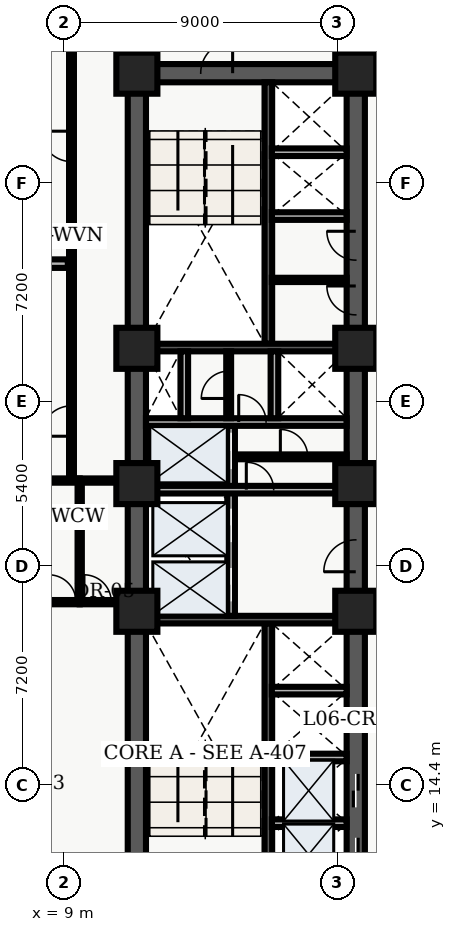
"""IFC4 building model, lengths in metres.
Left out: names, types, materials, properties, quantities, classifications, styles, units other than length and angle.
Written with IfcOpenShell. Run it as: python <this file> out.ifc"""

import sys

from ifc_helpers import new_model, entity, si_unit, converted_unit, direction, frame, origin_with_axes, origin_2d_with_axis, place, context, subcontext, project, spatial, polyline, rectangle, outline, extrude, element, fill, save


model = new_model("IFC4")
c1 = context("Model", 3, precision=1e-05, world=origin_with_axes(), true_north=direction((0.0, 1.0)))
c2 = subcontext(c1, "Body", "Model", "MODEL_VIEW")
j1 = project(units=[si_unit("LENGTHUNIT", "METRE"), converted_unit("PLANEANGLEUNIT", "DEGREE", entity("IfcPlaneAngleMeasure", 0.017), si_unit("PLANEANGLEUNIT", "RADIAN"), dimensions=[0, 0, 0, 0, 0, 0, 0])], contexts=[c1])
p1 = place(None, origin_with_axes())
s1 = spatial("IfcSite", under=j1, at=p1, CompositionType="ELEMENT")
p2 = place(p1, origin_with_axes())
s2 = spatial("IfcBuilding", under=s1, at=p2, CompositionType="ELEMENT")
p3 = place(p2, frame((0.0, 0.0, 28.8), z_axis=(0.0, 0.0, 1.0), x_axis=(1.0, 0.0, 0.0)))
s3 = spatial("IfcBuildingStorey", under=s2, at=p3, CompositionType="ELEMENT", Elevation=28.8)
p4 = place(p3, frame((11.4, 10.8, 0.0), z_axis=(0.0, 0.0, 1.0), x_axis=(0.0, 1.0, 0.0)))
e1 = element("IfcWall", 1, at=p4, inside=s3, PredefinedType="SHEAR", context=c2, shape_type="SweptSolid", body=[
    extrude(outline(polyline([(0.0, -0.3), (27.0, -0.3), (27.0, 0.3), (0.0, 0.3), (0.0, -0.3)])), origin_with_axes(), (0.0, 0.0, 1.0), 3.66),
])
p5 = place(p3, frame((11.4, 37.8, 0.0), z_axis=(0.0, 0.0, 1.0), x_axis=(1.0, 0.0, 0.0)))
e2 = element("IfcWall", 2, at=p5, inside=s3, PredefinedType="SHEAR", context=c2, shape_type="SweptSolid", body=[
    extrude(outline(polyline([(0.0, -0.3), (7.2, -0.3), (7.2, 0.3), (0.0, 0.3), (0.0, -0.3)])), origin_with_axes(), (0.0, 0.0, 1.0), 3.66),
])
p6 = place(p5, frame((2.625, 0.0, 0.0), z_axis=(0.0, 0.0, 1.0), x_axis=(1.0, 0.0, 0.0)))
e3 = element("IfcOpeningElement", 3, at=p6, cuts=e2, PredefinedType="OPENING", context=c2, shape_type="SweptSolid", body=[
    extrude(rectangle(XDim=1.05, YDim=0.62, at=origin_2d_with_axis()), origin_with_axes(), (0.0, 0.0, 1.0), 2.15),
])
p7 = place(p3, frame((18.6, 10.8, 0.0), z_axis=(0.0, 0.0, 1.0), x_axis=(0.0, 1.0, 0.0)))
e4 = element("IfcWall", 4, at=p7, inside=s3, PredefinedType="SHEAR", context=c2, shape_type="SweptSolid", body=[
    extrude(outline(polyline([(0.0, -0.3), (13.5, -0.3), (13.5, 0.3), (0.0, 0.3), (0.0, -0.3)])), origin_with_axes(), (0.0, 0.0, 1.0), 3.66),
])
p8 = place(p7, frame((1.3, 0.0, 0.0), z_axis=(0.0, 0.0, 1.0), x_axis=(1.0, 0.0, 0.0)))
e5 = element("IfcOpeningElement", 5, at=p8, cuts=e4, PredefinedType="OPENING", context=c2, shape_type="SweptSolid", body=[
    extrude(rectangle(XDim=1.1, YDim=0.62, at=origin_2d_with_axis()), origin_with_axes(), (0.0, 0.0, 1.0), 2.15),
])
p9 = place(p7, frame((3.4, 0.0, 0.0), z_axis=(0.0, 0.0, 1.0), x_axis=(1.0, 0.0, 0.0)))
e6 = element("IfcOpeningElement", 6, at=p9, cuts=e4, PredefinedType="OPENING", context=c2, shape_type="SweptSolid", body=[
    extrude(rectangle(XDim=1.1, YDim=0.62, at=origin_2d_with_axis()), origin_with_axes(), (0.0, 0.0, 1.0), 2.15),
])
p10 = place(p7, frame((11.125, 0.0, 0.0), z_axis=(0.0, 0.0, 1.0), x_axis=(1.0, 0.0, 0.0)))
e7 = element("IfcOpeningElement", 7, at=p10, cuts=e4, PredefinedType="OPENING", context=c2, shape_type="SweptSolid", body=[
    extrude(rectangle(XDim=1.05, YDim=0.62, at=origin_2d_with_axis()), origin_with_axes(), (0.0, 0.0, 1.0), 2.15),
])
p11 = place(p3, frame((18.6, 24.3, 0.0), z_axis=(0.0, 0.0, 1.0), x_axis=(0.0, 1.0, 0.0)))
e8 = element("IfcWall", 8, at=p11, inside=s3, PredefinedType="SHEAR", context=c2, shape_type="SweptSolid", body=[
    extrude(outline(polyline([(0.0, -0.3), (13.5, -0.3), (13.5, 0.3), (0.0, 0.3), (0.0, -0.3)])), origin_with_axes(), (0.0, 0.0, 1.0), 3.66),
])
p12 = place(p11, frame((6.025, 0.0, 0.0), z_axis=(0.0, 0.0, 1.0), x_axis=(1.0, 0.0, 0.0)))
e9 = element("IfcOpeningElement", 9, at=p12, cuts=e8, PredefinedType="OPENING", context=c2, shape_type="SweptSolid", body=[
    extrude(rectangle(XDim=0.95, YDim=0.62, at=origin_2d_with_axis()), origin_with_axes(), (0.0, 0.0, 1.0), 2.15),
])
p13 = place(p11, frame((7.825, 0.0, 0.0), z_axis=(0.0, 0.0, 1.0), x_axis=(1.0, 0.0, 0.0)))
e10 = element("IfcOpeningElement", 10, at=p13, cuts=e8, PredefinedType="OPENING", context=c2, shape_type="SweptSolid", body=[
    extrude(rectangle(XDim=0.95, YDim=0.62, at=origin_2d_with_axis()), origin_with_axes(), (0.0, 0.0, 1.0), 2.15),
])
p14 = place(p3, frame((15.725, 11.1, 0.0), z_axis=(0.0, 0.0, 1.0), x_axis=(0.0, 1.0, 0.0)))
e11 = element("IfcWall", 11, at=p14, inside=s3, PredefinedType="SHEAR", context=c2, shape_type="SweptSolid", body=[
    extrude(outline(polyline([(0.0, -0.125), (8.6, -0.125), (8.6, 0.125), (0.0, 0.125), (0.0, -0.125)])), origin_with_axes(), (0.0, 0.0, 1.0), 3.66),
])
p15 = place(p3, frame((11.7, 19.825, 0.0), z_axis=(0.0, 0.0, 1.0), x_axis=(1.0, 0.0, 0.0)))
e12 = element("IfcWall", 12, at=p15, inside=s3, PredefinedType="SHEAR", context=c2, shape_type="SweptSolid", body=[
    extrude(outline(polyline([(0.0, -0.125), (6.6, -0.125), (6.6, 0.125), (0.0, 0.125), (0.0, -0.125)])), origin_with_axes(), (0.0, 0.0, 1.0), 3.66),
])
p16 = place(p3, frame((15.725, 28.9, 0.0), z_axis=(0.0, 0.0, 1.0), x_axis=(0.0, 1.0, 0.0)))
e13 = element("IfcWall", 13, at=p16, inside=s3, PredefinedType="SHEAR", context=c2, shape_type="SweptSolid", body=[
    extrude(outline(polyline([(0.0, -0.125), (8.6, -0.125), (8.6, 0.125), (0.0, 0.125), (0.0, -0.125)])), origin_with_axes(), (0.0, 0.0, 1.0), 3.66),
])
p17 = place(p3, frame((11.7, 28.775, 0.0), z_axis=(0.0, 0.0, 1.0), x_axis=(1.0, 0.0, 0.0)))
e14 = element("IfcWall", 14, at=p17, inside=s3, PredefinedType="SHEAR", context=c2, shape_type="SweptSolid", body=[
    extrude(outline(polyline([(0.0, -0.125), (6.6, -0.125), (6.6, 0.125), (0.0, 0.125), (0.0, -0.125)])), origin_with_axes(), (0.0, 0.0, 1.0), 3.66),
])
p18 = place(p3, frame((14.5, 19.95, 0.0), z_axis=(0.0, 0.0, 1.0), x_axis=(0.0, 1.0, 0.0)))
e15 = element("IfcWall", 15, at=p18, inside=s3, PredefinedType="SOLIDWALL", context=c2, shape_type="SweptSolid", body=[
    extrude(outline(polyline([(0.0, -0.125), (6.25, -0.125), (6.25, 0.125), (0.0, 0.125), (0.0, -0.125)])), origin_with_axes(), (0.0, 0.0, 1.0), 2.7),
])
p19 = place(p18, frame((1.025, 0.0, 0.0), z_axis=(0.0, 0.0, 1.0), x_axis=(1.0, 0.0, 0.0)))
e16 = element("IfcOpeningElement", 16, at=p19, cuts=e15, PredefinedType="OPENING", context=c2, shape_type="SweptSolid", body=[
    extrude(rectangle(XDim=1.1, YDim=0.27, at=origin_2d_with_axis()), origin_with_axes(), (0.0, 0.0, 1.0), 2.15),
])
p20 = place(p18, frame((2.975, 0.0, 0.0), z_axis=(0.0, 0.0, 1.0), x_axis=(1.0, 0.0, 0.0)))
e17 = element("IfcOpeningElement", 17, at=p20, cuts=e15, PredefinedType="OPENING", context=c2, shape_type="SweptSolid", body=[
    extrude(rectangle(XDim=1.1, YDim=0.27, at=origin_2d_with_axis()), origin_with_axes(), (0.0, 0.0, 1.0), 2.15),
])
p21 = place(p18, frame((5.425, 0.0, 0.0), z_axis=(0.0, 0.0, 1.0), x_axis=(1.0, 0.0, 0.0)))
e18 = element("IfcOpeningElement", 18, at=p21, cuts=e15, PredefinedType="OPENING", context=c2, shape_type="SweptSolid", body=[
    extrude(rectangle(XDim=1.2, YDim=0.27, at=origin_2d_with_axis()), origin_with_axes(), (0.0, 0.0, 1.0), 2.15),
])
p22 = place(p3, frame((11.7, 24.1, 0.0), z_axis=(0.0, 0.0, 1.0), x_axis=(1.0, 0.0, 0.0)))
e19 = element("IfcWall", 19, at=p22, inside=s3, PredefinedType="SOLIDWALL", context=c2, shape_type="SweptSolid", body=[
    extrude(outline(polyline([(0.0, -0.125), (6.6, -0.125), (6.6, 0.125), (0.0, 0.125), (0.0, -0.125)])), origin_with_axes(), (0.0, 0.0, 1.0), 2.7),
])
p23 = place(p22, frame((3.75, 0.0, 0.0), z_axis=(0.0, 0.0, 1.0), x_axis=(1.0, 0.0, 0.0)))
e20 = element("IfcOpeningElement", 20, at=p23, cuts=e19, PredefinedType="OPENING", context=c2, shape_type="SweptSolid", body=[
    extrude(rectangle(XDim=0.9, YDim=0.27, at=origin_2d_with_axis()), origin_with_axes(), (0.0, 0.0, 1.0), 2.15),
])
p24 = place(p3, frame((11.7, 26.325, 0.0), z_axis=(0.0, 0.0, 1.0), x_axis=(1.0, 0.0, 0.0)))
e21 = element("IfcWall", 21, at=p24, inside=s3, PredefinedType="SOLIDWALL", context=c2, shape_type="SweptSolid", body=[
    extrude(outline(polyline([(0.0, -0.125), (6.6, -0.125), (6.6, 0.125), (0.0, 0.125), (0.0, -0.125)])), origin_with_axes(), (0.0, 0.0, 1.0), 2.7),
])
p25 = place(p24, frame((3.5, 0.0, 0.0), z_axis=(0.0, 0.0, 1.0), x_axis=(1.0, 0.0, 0.0)))
e22 = element("IfcOpeningElement", 22, at=p25, cuts=e21, PredefinedType="OPENING", context=c2, shape_type="SweptSolid", body=[
    extrude(rectangle(XDim=0.9, YDim=0.27, at=origin_2d_with_axis()), origin_with_axes(), (0.0, 0.0, 1.0), 2.15),
])
for number, where, z_axis, x_axis in (
    (23, (12.96, 26.45, 0.0), (0.0, 0.0, 1.0), (0.0, 1.0, 0.0)),
    (24, (15.925, 26.45, 0.0), (0.0, 0.0, 1.0), (0.0, 1.0, 0.0)),
):
    element("IfcWall", number, at=place(p3, frame(where, z_axis=z_axis, x_axis=x_axis)), inside=s3, PredefinedType="SOLIDWALL", context=c2, shape_type="SweptSolid", body=[
        extrude(outline(polyline([(0.0, -0.125), (2.2, -0.125), (2.2, 0.125), (0.0, 0.125), (0.0, -0.125)])), origin_with_axes(), (0.0, 0.0, 1.0), 2.7),
    ])
for number, where, z_axis, x_axis in (
    (25, (11.4, 20.1, 0.0), (0.0, 0.0, 1.0), (1.0, 0.0, 0.0)),
    (26, (11.4, 24.3, 0.0), (0.0, 0.0, 1.0), (1.0, 0.0, 0.0)),
    (27, (11.4, 28.75, 0.0), (0.0, 0.0, 1.0), (1.0, 0.0, 0.0)),
    (28, (11.4, 37.8, 0.0), (0.0, 0.0, 1.0), (1.0, 0.0, 0.0)),
    (29, (18.6, 20.1, 0.0), (0.0, 0.0, 1.0), (1.0, 0.0, 0.0)),
    (30, (18.6, 24.3, 0.0), (0.0, 0.0, 1.0), (1.0, 0.0, 0.0)),
    (31, (18.6, 28.75, 0.0), (0.0, 0.0, 1.0), (1.0, 0.0, 0.0)),
    (32, (18.6, 37.8, 0.0), (0.0, 0.0, 1.0), (1.0, 0.0, 0.0)),
):
    element("IfcColumn", number, at=place(p3, frame(where, z_axis=z_axis, x_axis=x_axis)), inside=s3, PredefinedType="COLUMN", context=c2, shape_type="SweptSolid", body=[
        extrude(rectangle(XDim=1.35, YDim=1.35, at=origin_2d_with_axis()), origin_with_axes(), (0.0, 0.0, 1.0), 3.9),
    ])
p26 = place(p3, frame((14.62, 25.18, 0.0), z_axis=(0.0, 0.0, 1.0), x_axis=(1.0, 0.0, 0.0)))
e33 = element("IfcWall", 33, at=p26, inside=s3, PredefinedType="PARTITIONING", context=c2, shape_type="SweptSolid", body=[
    extrude(outline(polyline([(0.0, -0.08), (3.68, -0.08), (3.68, 0.08), (0.0, 0.08), (0.0, -0.08)])), origin_with_axes(), (0.0, 0.0, 1.0), 2.7),
])
p27 = place(p26, frame((1.95, 0.0, 0.0), z_axis=(0.0, 0.0, 1.0), x_axis=(1.0, 0.0, 0.0)))
e34 = element("IfcOpeningElement", 34, at=p27, cuts=e33, PredefinedType="OPENING", context=c2, shape_type="SweptSolid", body=[
    extrude(rectangle(XDim=0.9, YDim=0.18, at=origin_2d_with_axis()), origin_with_axes(), (0.0, 0.0, 1.0), 2.15),
])
p28 = place(p3, frame((14.42, 26.45, 0.0), z_axis=(0.0, 0.0, 1.0), x_axis=(0.0, 1.0, 0.0)))
e35 = element("IfcWall", 35, at=p28, inside=s3, PredefinedType="PARTITIONING", context=c2, shape_type="SweptSolid", body=[
    extrude(outline(polyline([(0.0, -0.08), (2.2, -0.08), (2.2, 0.08), (0.0, 0.08), (0.0, -0.08)])), origin_with_axes(), (0.0, 0.0, 1.0), 2.7),
])
p29 = place(p28, frame((1.1, 0.0, 0.0), z_axis=(0.0, 0.0, 1.0), x_axis=(1.0, 0.0, 0.0)))
e36 = element("IfcOpeningElement", 36, at=p29, cuts=e35, PredefinedType="OPENING", context=c2, shape_type="SweptSolid", body=[
    extrude(rectangle(XDim=0.9, YDim=0.18, at=origin_2d_with_axis()), origin_with_axes(), (0.0, 0.0, 1.0), 2.15),
])
for number, where, z_axis, x_axis in (
    (37, (15.84, 13.13, 0.0), (0.0, 0.0, 1.0), (1.0, 0.0, 0.0)),
    (38, (15.84, 15.29, 0.0), (0.0, 0.0, 1.0), (1.0, 0.0, 0.0)),
    (39, (15.84, 17.49, 0.0), (0.0, 0.0, 1.0), (1.0, 0.0, 0.0)),
    (40, (15.84, 33.1, 0.0), (0.0, 0.0, 1.0), (1.0, 0.0, 0.0)),
    (41, (15.84, 35.2, 0.0), (0.0, 0.0, 1.0), (1.0, 0.0, 0.0)),
):
    element("IfcWall", number, at=place(p3, frame(where, z_axis=z_axis, x_axis=x_axis)), inside=s3, PredefinedType="SOLIDWALL", context=c2, shape_type="SweptSolid", body=[
        extrude(outline(polyline([(0.0, -0.125), (2.46, -0.125), (2.46, 0.125), (0.0, 0.125), (0.0, -0.125)])), origin_with_axes(), (0.0, 0.0, 1.0), 2.7),
    ])
p30 = place(p3, frame((15.84, 31.0, 0.0), z_axis=(0.0, 0.0, 1.0), x_axis=(1.0, 0.0, 0.0)))
e42 = element("IfcWall", 42, at=p30, inside=s3, PredefinedType="PARTITIONING", context=c2, shape_type="SweptSolid", body=[
    extrude(outline(polyline([(0.0, -0.07), (2.46, -0.07), (2.46, 0.07), (0.0, 0.07), (0.0, -0.07)])), origin_with_axes(), (0.0, 0.0, 1.0), 2.7),
])
p31 = place(p3, frame((9.52, 20.4, 0.0), z_axis=(0.0, 0.0, 1.0), x_axis=(0.0, 1.0, 0.0)))
e43 = element("IfcWall", 43, at=p31, inside=s3, PredefinedType="PARTITIONING", context=c2, shape_type="SweptSolid", body=[
    extrude(outline(polyline([(0.0, -0.07), (4.0, -0.07), (4.0, 0.07), (0.0, 0.07), (0.0, -0.07)])), origin_with_axes(), (0.0, 0.0, 1.0), 2.7),
])
p32 = place(p3, frame((9.52, 20.4, 0.0), z_axis=(0.0, 0.0, 1.0), x_axis=(1.0, 0.0, 0.0)))
e44 = element("IfcWall", 44, at=p32, inside=s3, PredefinedType="PARTITIONING", context=c2, shape_type="SweptSolid", body=[
    extrude(outline(polyline([(0.0, -0.07), (1.58, -0.07), (1.58, 0.07), (0.0, 0.07), (0.0, -0.07)])), origin_with_axes(), (0.0, 0.0, 1.0), 2.7),
])
p33 = place(p32, frame((0.59, 0.0, 0.0), z_axis=(0.0, 0.0, 1.0), x_axis=(1.0, 0.0, 0.0)))
e45 = element("IfcOpeningElement", 45, at=p33, cuts=e44, PredefinedType="OPENING", context=c2, shape_type="SweptSolid", body=[
    extrude(rectangle(XDim=0.9, YDim=0.16, at=origin_2d_with_axis()), origin_with_axes(), (0.0, 0.0, 1.0), 2.15),
])
p34 = place(p3, frame((9.52, 24.4, 0.0), z_axis=(0.0, 0.0, 1.0), x_axis=(1.0, 0.0, 0.0)))
e46 = element("IfcWall", 46, at=p34, inside=s3, PredefinedType="PARTITIONING", context=c2, shape_type="SweptSolid", body=[
    extrude(outline(polyline([(0.0, -0.07), (1.58, -0.07), (1.58, 0.07), (0.0, 0.07), (0.0, -0.07)])), origin_with_axes(), (0.0, 0.0, 1.0), 2.7),
])
p35 = place(p3, frame((9.25, 24.4, 0.0), z_axis=(0.0, 0.0, 1.0), x_axis=(0.0, 1.0, 0.0)))
e47 = element("IfcWall", 47, at=p35, inside=s3, PredefinedType="PARTITIONING", context=c2, shape_type="SweptSolid", body=[
    extrude(outline(polyline([(0.0, -0.08), (16.1, -0.08), (16.1, 0.08), (0.0, 0.08), (0.0, -0.08)])), origin_with_axes(), (0.0, 0.0, 1.0), 2.7),
])
p36 = place(p35, frame((1.958, 0.0, 0.0), z_axis=(0.0, 0.0, 1.0), x_axis=(1.0, 0.0, 0.0)))
e48 = element("IfcOpeningElement", 48, at=p36, cuts=e47, PredefinedType="OPENING", context=c2, shape_type="SweptSolid", body=[
    extrude(rectangle(XDim=1.0, YDim=0.18, at=origin_2d_with_axis()), origin_with_axes(), (0.0, 0.0, 1.0), 2.15),
])
p37 = place(p35, frame((10.992, 0.0, 0.0), z_axis=(0.0, 0.0, 1.0), x_axis=(1.0, 0.0, 0.0)))
e49 = element("IfcOpeningElement", 49, at=p37, cuts=e47, PredefinedType="OPENING", context=c2, shape_type="SweptSolid", body=[
    extrude(rectangle(XDim=1.0, YDim=0.18, at=origin_2d_with_axis()), origin_with_axes(), (0.0, 0.0, 1.0), 2.15),
])
p38 = place(p3, frame((0.36, 20.4, 0.0), z_axis=(0.0, 0.0, 1.0), x_axis=(1.0, 0.0, 0.0)))
e50 = element("IfcWall", 50, at=p38, inside=s3, PredefinedType="PARTITIONING", context=c2, shape_type="SweptSolid", body=[
    extrude(outline(polyline([(0.0, -0.07), (9.16, -0.07), (9.16, 0.07), (0.0, 0.07), (0.0, -0.07)])), origin_with_axes(), (0.0, 0.0, 1.0), 2.7),
])
p39 = place(p38, frame((8.59, 0.0, 0.0), z_axis=(0.0, 0.0, 1.0), x_axis=(1.0, 0.0, 0.0)))
e51 = element("IfcOpeningElement", 51, at=p39, cuts=e50, PredefinedType="OPENING", context=c2, shape_type="SweptSolid", body=[
    extrude(rectangle(XDim=0.9, YDim=0.16, at=origin_2d_with_axis()), origin_with_axes(), (0.0, 0.0, 1.0), 2.15),
])
p40 = place(p3, frame((0.36, 24.4, 0.0), z_axis=(0.0, 0.0, 1.0), x_axis=(1.0, 0.0, 0.0)))
e52 = element("IfcWall", 52, at=p40, inside=s3, PredefinedType="PARTITIONING", context=c2, shape_type="SweptSolid", body=[
    extrude(outline(polyline([(0.0, -0.07), (9.16, -0.07), (9.16, 0.07), (0.0, 0.07), (0.0, -0.07)])), origin_with_axes(), (0.0, 0.0, 1.0), 2.7),
])
p41 = place(p3, frame((0.375, 31.535, 0.0), z_axis=(0.0, 0.0, 1.0), x_axis=(1.0, 0.0, 0.0)))
e53 = element("IfcWall", 53, at=p41, inside=s3, PredefinedType="PARTITIONING", context=c2, shape_type="SweptSolid", body=[
    extrude(outline(polyline([(0.0, -0.14), (8.755, -0.14), (8.755, 0.14), (0.0, 0.14), (0.0, -0.14)])), origin_with_axes(), (0.0, 0.0, 1.0), 2.7),
])
p42 = place(p7, frame((1.3, 0.0, 0.0), z_axis=(0.0, 0.0, 1.0), x_axis=(1.0, 0.0, 0.0)))
e54 = element("IfcDoor", 54, at=p42, inside=s3, OperationType="SLIDING_TO_LEFT", PredefinedType="DOOR", context=c2, shape_type="SweptSolid", body=[
    extrude(rectangle(XDim=1.1, YDim=0.09, at=origin_2d_with_axis()), origin_with_axes(), (0.0, 0.0, 1.0), 2.15),
])
fill(e5, e54)
p43 = place(p7, frame((3.4, 0.0, 0.0), z_axis=(0.0, 0.0, 1.0), x_axis=(1.0, 0.0, 0.0)))
e55 = element("IfcDoor", 55, at=p43, inside=s3, OperationType="SLIDING_TO_RIGHT", PredefinedType="DOOR", context=c2, shape_type="SweptSolid", body=[
    extrude(rectangle(XDim=1.1, YDim=0.09, at=origin_2d_with_axis()), origin_with_axes(), (0.0, 0.0, 1.0), 2.15),
])
fill(e6, e55)
p44 = place(p18, frame((1.025, 0.0, 0.0), z_axis=(0.0, 0.0, 1.0), x_axis=(1.0, 0.0, 0.0)))
e56 = element("IfcDoor", 56, at=p44, inside=s3, OperationType="SLIDING_TO_LEFT", PredefinedType="DOOR", context=c2, shape_type="SweptSolid", body=[
    extrude(rectangle(XDim=1.1, YDim=0.09, at=origin_2d_with_axis()), origin_with_axes(), (0.0, 0.0, 1.0), 2.15),
])
fill(e16, e56)
p45 = place(p18, frame((2.975, 0.0, 0.0), z_axis=(0.0, 0.0, 1.0), x_axis=(1.0, 0.0, 0.0)))
e57 = element("IfcDoor", 57, at=p45, inside=s3, OperationType="SLIDING_TO_RIGHT", PredefinedType="DOOR", context=c2, shape_type="SweptSolid", body=[
    extrude(rectangle(XDim=1.1, YDim=0.09, at=origin_2d_with_axis()), origin_with_axes(), (0.0, 0.0, 1.0), 2.15),
])
fill(e17, e57)
p46 = place(p18, frame((5.425, 0.0, 0.0), z_axis=(0.0, 0.0, 1.0), x_axis=(1.0, 0.0, 0.0)))
e58 = element("IfcDoor", 58, at=p46, inside=s3, OperationType="DOUBLE_DOOR_SLIDING", PredefinedType="DOOR", context=c2, shape_type="SweptSolid", body=[
    extrude(rectangle(XDim=1.2, YDim=0.09, at=origin_2d_with_axis()), origin_with_axes(), (0.0, 0.0, 1.0), 2.15),
])
fill(e18, e58)
p47 = place(p5, frame((2.625, 0.0, 0.0), z_axis=(0.0, 0.0, 1.0), x_axis=(1.0, 0.0, 0.0)))
e59 = element("IfcDoor", 59, at=p47, inside=s3, OperationType="SINGLE_SWING_RIGHT", PredefinedType="DOOR", context=c2, shape_type="SweptSolid", body=[
    extrude(rectangle(XDim=1.05, YDim=0.09, at=origin_2d_with_axis()), origin_with_axes(), (0.0, 0.0, 1.0), 2.15),
])
fill(e3, e59)
p48 = place(p7, frame((11.125, 0.0, 0.0), z_axis=(0.0, 0.0, 1.0), x_axis=(1.0, 0.0, 0.0)))
e60 = element("IfcDoor", 60, at=p48, inside=s3, OperationType="SINGLE_SWING_LEFT", PredefinedType="DOOR", context=c2, shape_type="SweptSolid", body=[
    extrude(rectangle(XDim=1.05, YDim=0.09, at=origin_2d_with_axis()), origin_with_axes(), (0.0, 0.0, 1.0), 2.15),
])
fill(e7, e60)
p49 = place(p24, frame((3.5, 0.0, 0.0), z_axis=(0.0, 0.0, 1.0), x_axis=(1.0, 0.0, 0.0)))
e61 = element("IfcDoor", 61, at=p49, inside=s3, OperationType="SINGLE_SWING_LEFT", PredefinedType="DOOR", context=c2, shape_type="SweptSolid", body=[
    extrude(rectangle(XDim=0.9, YDim=0.09, at=origin_2d_with_axis()), origin_with_axes(), (0.0, 0.0, 1.0), 2.15),
])
fill(e22, e61)
p50 = place(p28, frame((1.1, 0.0, 0.0), z_axis=(0.0, 0.0, 1.0), x_axis=(1.0, 0.0, 0.0)))
e62 = element("IfcDoor", 62, at=p50, inside=s3, OperationType="SINGLE_SWING_LEFT", PredefinedType="DOOR", context=c2, shape_type="SweptSolid", body=[
    extrude(rectangle(XDim=0.9, YDim=0.09, at=origin_2d_with_axis()), origin_with_axes(), (0.0, 0.0, 1.0), 2.15),
])
fill(e36, e62)
p51 = place(p22, frame((3.75, 0.0, 0.0), z_axis=(0.0, 0.0, 1.0), x_axis=(1.0, 0.0, 0.0)))
e63 = element("IfcDoor", 63, at=p51, inside=s3, OperationType="SINGLE_SWING_LEFT", PredefinedType="DOOR", context=c2, shape_type="SweptSolid", body=[
    extrude(rectangle(XDim=0.9, YDim=0.09, at=origin_2d_with_axis()), origin_with_axes(), (0.0, 0.0, 1.0), 2.15),
])
fill(e20, e63)
p52 = place(p26, frame((1.95, 0.0, 0.0), z_axis=(0.0, 0.0, 1.0), x_axis=(1.0, 0.0, 0.0)))
e64 = element("IfcDoor", 64, at=p52, inside=s3, OperationType="SINGLE_SWING_LEFT", PredefinedType="DOOR", context=c2, shape_type="SweptSolid", body=[
    extrude(rectangle(XDim=0.9, YDim=0.09, at=origin_2d_with_axis()), origin_with_axes(), (0.0, 0.0, 1.0), 2.15),
])
fill(e34, e64)
p53 = place(p11, frame((6.025, 0.0, 0.0), z_axis=(0.0, 0.0, 1.0), x_axis=(1.0, 0.0, 0.0)))
e65 = element("IfcDoor", 65, at=p53, inside=s3, OperationType="SINGLE_SWING_RIGHT", PredefinedType="DOOR", context=c2, shape_type="SweptSolid", body=[
    extrude(rectangle(XDim=0.95, YDim=0.09, at=origin_2d_with_axis()), origin_with_axes(), (0.0, 0.0, 1.0), 2.15),
])
fill(e9, e65)
p54 = place(p11, frame((7.825, 0.0, 0.0), z_axis=(0.0, 0.0, 1.0), x_axis=(1.0, 0.0, 0.0)))
e66 = element("IfcDoor", 66, at=p54, inside=s3, OperationType="SINGLE_SWING_RIGHT", PredefinedType="DOOR", context=c2, shape_type="SweptSolid", body=[
    extrude(rectangle(XDim=0.95, YDim=0.09, at=origin_2d_with_axis()), origin_with_axes(), (0.0, 0.0, 1.0), 2.15),
])
fill(e10, e66)
p55 = place(p32, frame((0.59, 0.0, 0.0), z_axis=(0.0, 0.0, 1.0), x_axis=(1.0, 0.0, 0.0)))
e67 = element("IfcDoor", 67, at=p55, inside=s3, OperationType="SINGLE_SWING_LEFT", PredefinedType="DOOR", context=c2, shape_type="SweptSolid", body=[
    extrude(rectangle(XDim=0.9, YDim=0.084, at=origin_2d_with_axis()), origin_with_axes(), (0.0, 0.0, 1.0), 2.15),
])
fill(e45, e67)
p56 = place(p38, frame((8.59, 0.0, 0.0), z_axis=(0.0, 0.0, 1.0), x_axis=(1.0, 0.0, 0.0)))
e68 = element("IfcDoor", 68, at=p56, inside=s3, OperationType="SINGLE_SWING_LEFT", PredefinedType="DOOR", context=c2, shape_type="SweptSolid", body=[
    extrude(rectangle(XDim=0.9, YDim=0.084, at=origin_2d_with_axis()), origin_with_axes(), (0.0, 0.0, 1.0), 2.15),
])
fill(e51, e68)
p57 = place(p35, frame((1.958, 0.0, 0.0), z_axis=(0.0, 0.0, 1.0), x_axis=(1.0, 0.0, 0.0)))
e69 = element("IfcDoor", 69, at=p57, inside=s3, OperationType="SINGLE_SWING_LEFT", PredefinedType="DOOR", context=c2, shape_type="SweptSolid", body=[
    extrude(rectangle(XDim=1.0, YDim=0.09, at=origin_2d_with_axis()), origin_with_axes(), (0.0, 0.0, 1.0), 2.15),
])
fill(e48, e69)
p58 = place(p35, frame((10.992, 0.0, 0.0), z_axis=(0.0, 0.0, 1.0), x_axis=(1.0, 0.0, 0.0)))
e70 = element("IfcDoor", 70, at=p58, inside=s3, OperationType="SINGLE_SWING_RIGHT", PredefinedType="DOOR", context=c2, shape_type="SweptSolid", body=[
    extrude(rectangle(XDim=1.0, YDim=0.09, at=origin_2d_with_axis()), origin_with_axes(), (0.0, 0.0, 1.0), 2.15),
])
fill(e49, e70)
save(model, sys.argv[1])
